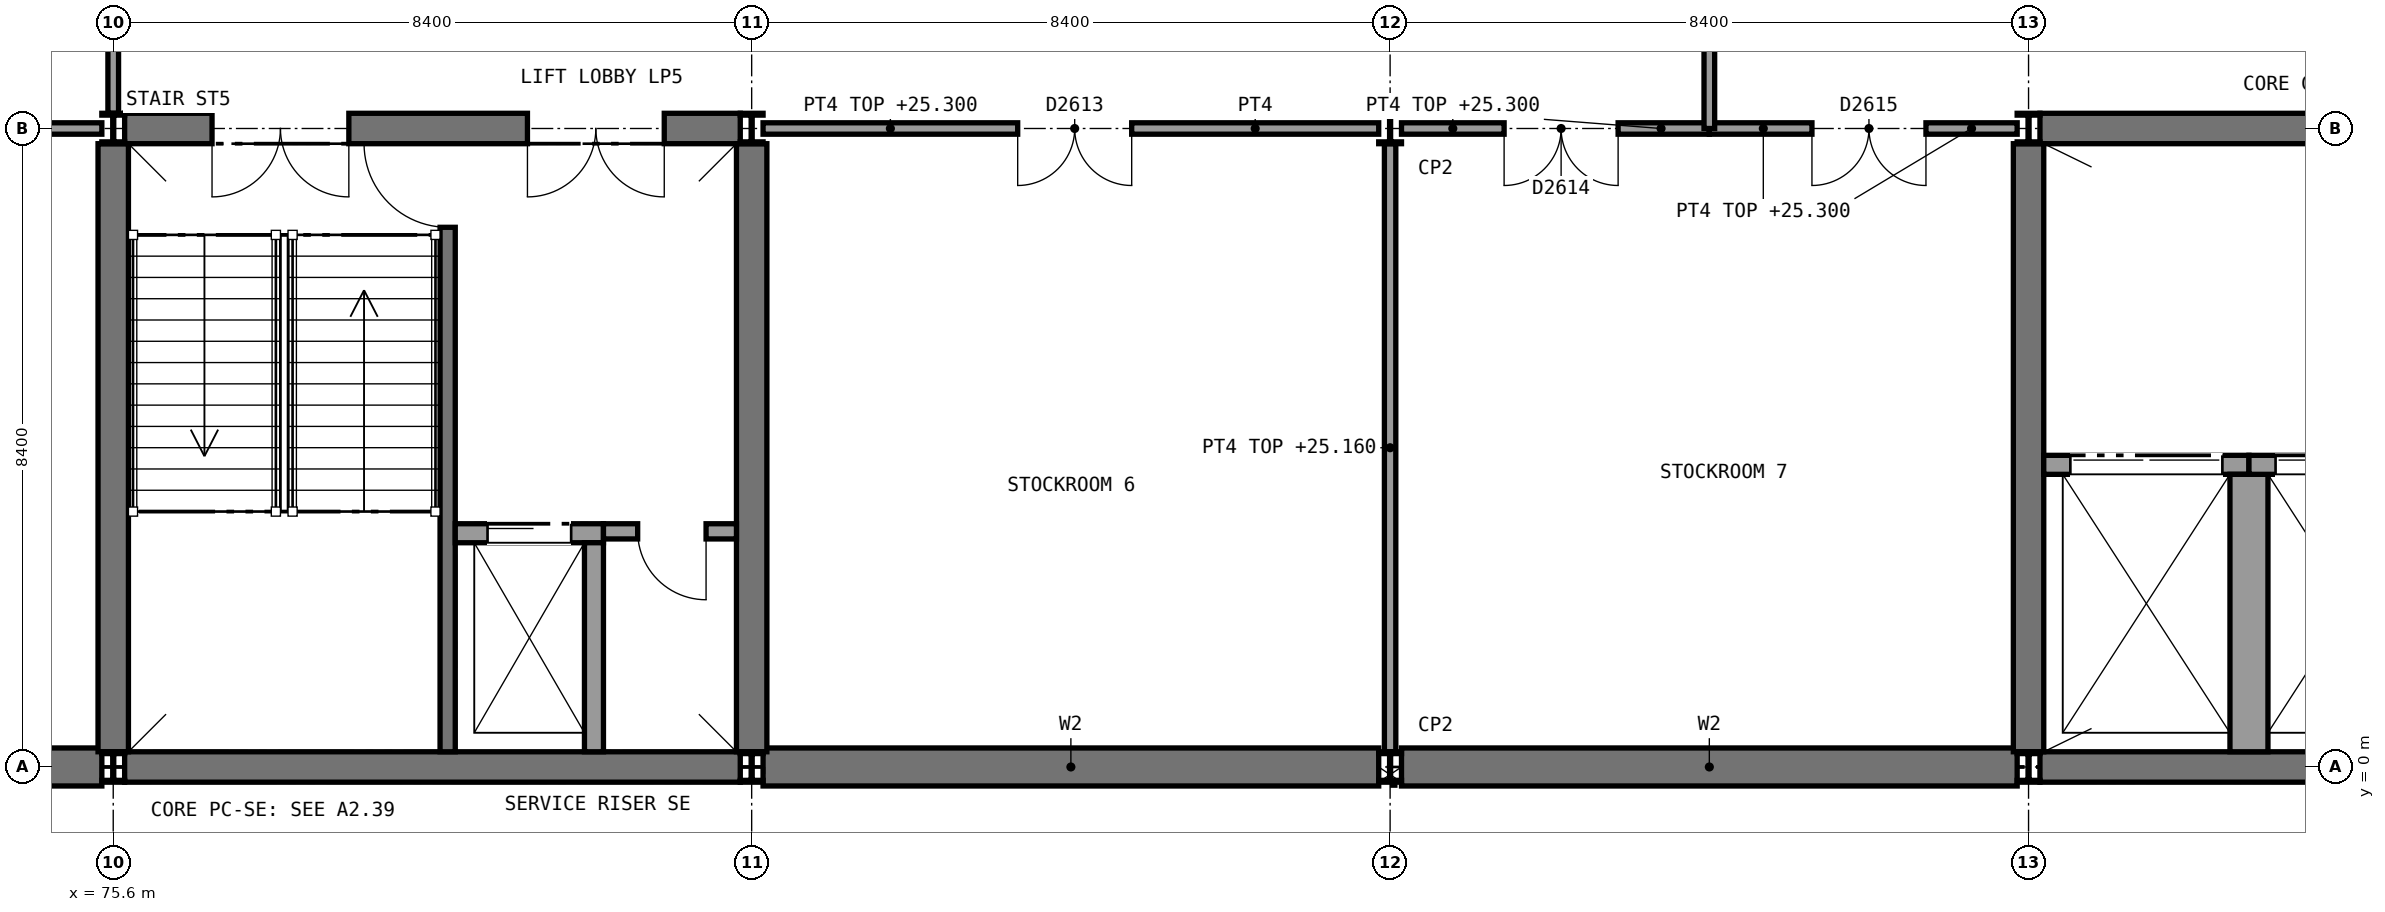
"""IFC4 building model, lengths in metres.
Left out: names, types, materials, properties, quantities, classifications, styles, units other than length and angle.
Written with IfcOpenShell. Run it as: python <this file> out.ifc"""

import sys

from ifc_helpers import new_model, si_unit, direction, frame, frame_2d, origin, origin_2d, place, context, subcontext, project, spatial, rectangle, i_section, extrude, element, fill, save


model = new_model("IFC4")
c1 = context("Model", 3, precision=1e-05, world=origin(), true_north=direction((0.0, 1.0)))
c2 = subcontext(c1, "Body", "Model", "MODEL_VIEW")
j1 = project(units=[si_unit("LENGTHUNIT", "METRE"), si_unit("PLANEANGLEUNIT", "RADIAN")], contexts=[c1])
p1 = place(None, origin())
s1 = spatial("IfcSite", under=j1, at=p1, CompositionType="ELEMENT")
p2 = place(p1, origin())
s2 = spatial("IfcBuilding", under=s1, at=p2, CompositionType="ELEMENT")
p3 = place(p2, frame((0.0, 0.0, 21.0)))
s3 = spatial("IfcBuildingStorey", under=s2, at=p3, CompositionType="ELEMENT", Elevation=21.0)
p4 = place(p3, frame((67.35, 0.0, 0.0), z_axis=(0.0, 0.0, 1.0), x_axis=(1.0, 0.0, 0.0)))
e1 = element("IfcWall", 1, at=p4, inside=s3, PredefinedType="SHEAR", context=c2, shape_type="SweptSolid", body=[
    extrude(rectangle(XDim=8.1, YDim=0.5, at=frame_2d((4.05, 0.0))), origin(), (0.0, 0.0, 1.0), 4.65),
])
p5 = place(p3, frame((84.15, 0.0, 0.0), z_axis=(0.0, 0.0, 1.0), x_axis=(1.0, 0.0, 0.0)))
e2 = element("IfcWall", 2, at=p5, inside=s3, PredefinedType="SHEAR", context=c2, shape_type="SweptSolid", body=[
    extrude(rectangle(XDim=8.1, YDim=0.5, at=frame_2d((4.05, 0.0))), origin(), (0.0, 0.0, 1.0), 4.65),
])
p6 = place(p3, frame((92.55, 0.0, 0.0), z_axis=(0.0, 0.0, 1.0), x_axis=(1.0, 0.0, 0.0)))
e3 = element("IfcWall", 3, at=p6, inside=s3, PredefinedType="SHEAR", context=c2, shape_type="SweptSolid", body=[
    extrude(rectangle(XDim=8.1, YDim=0.5, at=frame_2d((4.05, 0.0))), origin(), (0.0, 0.0, 1.0), 4.65),
])
p7 = place(p3, frame((75.75, 0.0, 0.0), z_axis=(0.0, 0.0, 1.0), x_axis=(1.0, 0.0, 0.0)))
e4 = element("IfcWall", 4, at=p7, inside=s3, PredefinedType="SHEAR", context=c2, shape_type="SweptSolid", body=[
    extrude(rectangle(XDim=8.1, YDim=0.4, at=frame_2d((4.05, 0.0))), origin(), (0.0, 0.0, 1.0), 4.65),
])
p8 = place(p3, frame((75.75, 8.4, 0.0), z_axis=(0.0, 0.0, 1.0), x_axis=(1.0, 0.0, 0.0)))
e5 = element("IfcWall", 5, at=p8, inside=s3, PredefinedType="SHEAR", context=c2, shape_type="SweptSolid", body=[
    extrude(rectangle(XDim=8.1, YDim=0.4, at=frame_2d((4.05, 0.0))), origin(), (0.0, 0.0, 1.0), 4.65),
])
p9 = place(p8, frame((1.15, 0.0, 0.0)))
e6 = element("IfcOpeningElement", 6, at=p9, cuts=e5, PredefinedType="OPENING", context=c2, shape_type="SweptSolid", body=[
    extrude(rectangle(XDim=1.8, YDim=2.1, at=frame_2d((0.9, 1.05))), frame((0.0, 0.21, 0.0), z_axis=(0.0, -1.0, 0.0), x_axis=(1.0, 0.0, 0.0)), (0.0, 0.0, 1.0), 0.42),
])
p10 = place(p8, frame((5.3, 0.0, 0.0)))
e7 = element("IfcOpeningElement", 7, at=p10, cuts=e5, PredefinedType="OPENING", context=c2, shape_type="SweptSolid", body=[
    extrude(rectangle(XDim=1.8, YDim=2.1, at=frame_2d((0.9, 1.05))), frame((0.0, 0.21, 0.0), z_axis=(0.0, -1.0, 0.0), x_axis=(1.0, 0.0, 0.0)), (0.0, 0.0, 1.0), 0.42),
])
for number, where, z_axis, x_axis in (
    (8, (75.6, 0.2, 0.0), (0.0, 0.0, 1.0), (0.0, 1.0, 0.0)),
    (9, (84.0, 0.2, 0.0), (0.0, 0.0, 1.0), (0.0, 1.0, 0.0)),
):
    element("IfcWall", number, at=place(p3, frame(where, z_axis=z_axis, x_axis=x_axis)), inside=s3, PredefinedType="SHEAR", context=c2, shape_type="SweptSolid", body=[
        extrude(rectangle(XDim=8.0, YDim=0.4, at=frame_2d((4.0, 0.0))), origin(), (0.0, 0.0, 1.0), 4.65),
    ])
p11 = place(p3, frame((100.95, 0.0, 0.0), z_axis=(0.0, 0.0, 1.0), x_axis=(1.0, 0.0, 0.0)))
e10 = element("IfcWall", 10, at=p11, inside=s3, PredefinedType="SHEAR", context=c2, shape_type="SweptSolid", body=[
    extrude(rectangle(XDim=16.45, YDim=0.4, at=frame_2d((8.225, 0.0))), origin(), (0.0, 0.0, 1.0), 4.65),
])
p12 = place(p3, frame((100.95, 8.4, 0.0), z_axis=(0.0, 0.0, 1.0), x_axis=(1.0, 0.0, 0.0)))
e11 = element("IfcWall", 11, at=p12, inside=s3, PredefinedType="SHEAR", context=c2, shape_type="SweptSolid", body=[
    extrude(rectangle(XDim=16.45, YDim=0.4, at=frame_2d((8.225, 0.0))), origin(), (0.0, 0.0, 1.0), 4.65),
])
p13 = place(p12, frame((13.55, 0.0, 0.0)))
e12 = element("IfcOpeningElement", 12, at=p13, cuts=e11, PredefinedType="OPENING", context=c2, shape_type="SweptSolid", body=[
    extrude(rectangle(XDim=1.8, YDim=2.1, at=frame_2d((0.9, 1.05))), frame((0.0, 0.21, 0.0), z_axis=(0.0, -1.0, 0.0), x_axis=(1.0, 0.0, 0.0)), (0.0, 0.0, 1.0), 0.42),
])
p14 = place(p12, frame((4.65, 0.0, 0.0)))
e13 = element("IfcOpeningElement", 13, at=p14, cuts=e11, PredefinedType="OPENING", context=c2, shape_type="SweptSolid", body=[
    extrude(rectangle(XDim=2.4, YDim=2.4, at=frame_2d((1.2, 1.2))), frame((0.0, 0.21, 0.0), z_axis=(0.0, -1.0, 0.0), x_axis=(1.0, 0.0, 0.0)), (0.0, 0.0, 1.0), 0.42),
])
p15 = place(p3, frame((100.8, 0.2, 0.0), z_axis=(0.0, 0.0, 1.0), x_axis=(0.0, 1.0, 0.0)))
e14 = element("IfcWall", 14, at=p15, inside=s3, PredefinedType="SHEAR", context=c2, shape_type="SweptSolid", body=[
    extrude(rectangle(XDim=8.0, YDim=0.4, at=frame_2d((4.0, 0.0))), origin(), (0.0, 0.0, 1.0), 4.65),
])
for number, where, z_axis, x_axis in (
    (15, (75.6, 0.0, 0.0), (0.0, 0.0, 1.0), (1.0, 0.0, 0.0)),
    (16, (75.6, 8.4, 0.0), (0.0, 0.0, 1.0), (1.0, 0.0, 0.0)),
    (17, (84.0, 0.0, 0.0), (0.0, 0.0, 1.0), (1.0, 0.0, 0.0)),
    (18, (84.0, 8.4, 0.0), (0.0, 0.0, 1.0), (1.0, 0.0, 0.0)),
    (19, (92.4, 0.0, 0.0), (0.0, 0.0, 1.0), (1.0, 0.0, 0.0)),
    (20, (92.4, 8.4, 0.0), (0.0, 0.0, 1.0), (1.0, 0.0, 0.0)),
    (21, (100.8, 0.0, 0.0), (0.0, 0.0, 1.0), (1.0, 0.0, 0.0)),
    (22, (100.8, 8.4, 0.0), (0.0, 0.0, 1.0), (1.0, 0.0, 0.0)),
):
    element("IfcColumn", number, at=place(p3, frame(where, z_axis=z_axis, x_axis=x_axis)), inside=s3, PredefinedType="COLUMN", context=c2, shape_type="SweptSolid", body=[
        extrude(i_section(OverallWidth=0.3, OverallDepth=0.4, WebThickness=0.013, FlangeThickness=0.024, FilletRadius=0.027, at=origin_2d()), origin(), (0.0, 0.0, 1.0), 4.8),
    ])
p16 = place(p3, frame((67.35, 8.4, 0.0), z_axis=(0.0, 0.0, 1.0), x_axis=(1.0, 0.0, 0.0)))
e23 = element("IfcWall", 23, at=p16, inside=s3, PredefinedType="SOLIDWALL", context=c2, shape_type="SweptSolid", body=[
    extrude(rectangle(XDim=8.1, YDim=0.15, at=frame_2d((4.05, 0.0))), origin(), (0.0, 0.0, 1.0), 4.3),
])
p17 = place(p16, frame((3.35, 0.0, 0.0)))
e24 = element("IfcOpeningElement", 24, at=p17, cuts=e23, PredefinedType="OPENING", context=c2, shape_type="SweptSolid", body=[
    extrude(rectangle(XDim=1.5, YDim=2.1, at=frame_2d((0.75, 1.05))), frame((0.0, 0.085, 0.0), z_axis=(0.0, -1.0, 0.0), x_axis=(1.0, 0.0, 0.0)), (0.0, 0.0, 1.0), 0.17),
])
p18 = place(p3, frame((92.4, 0.2, 0.0), z_axis=(0.0, 0.0, 1.0), x_axis=(0.0, 1.0, 0.0)))
e25 = element("IfcWall", 25, at=p18, inside=s3, PredefinedType="SOLIDWALL", context=c2, shape_type="SweptSolid", body=[
    extrude(rectangle(XDim=8.0, YDim=0.15, at=frame_2d((4.0, 0.0))), origin(), (0.0, 0.0, 1.0), 4.16),
])
p19 = place(p3, frame((84.15, 8.4, 0.0), z_axis=(0.0, 0.0, 1.0), x_axis=(1.0, 0.0, 0.0)))
e26 = element("IfcWall", 26, at=p19, inside=s3, PredefinedType="SOLIDWALL", context=c2, shape_type="SweptSolid", body=[
    extrude(rectangle(XDim=8.1, YDim=0.15, at=frame_2d((4.05, 0.0))), origin(), (0.0, 0.0, 1.0), 4.3),
])
p20 = place(p19, frame((3.35, 0.0, 0.0)))
e27 = element("IfcOpeningElement", 27, at=p20, cuts=e26, PredefinedType="OPENING", context=c2, shape_type="SweptSolid", body=[
    extrude(rectangle(XDim=1.5, YDim=2.1, at=frame_2d((0.75, 1.05))), frame((0.0, 0.085, 0.0), z_axis=(0.0, -1.0, 0.0), x_axis=(1.0, 0.0, 0.0)), (0.0, 0.0, 1.0), 0.17),
])
p21 = place(p3, frame((92.55, 8.4, 0.0), z_axis=(0.0, 0.0, 1.0), x_axis=(1.0, 0.0, 0.0)))
e28 = element("IfcWall", 28, at=p21, inside=s3, PredefinedType="SOLIDWALL", context=c2, shape_type="SweptSolid", body=[
    extrude(rectangle(XDim=4.05, YDim=0.15, at=frame_2d((2.025, 0.0))), origin(), (0.0, 0.0, 1.0), 4.3),
])
p22 = place(p21, frame((1.35, 0.0, 0.0)))
e29 = element("IfcOpeningElement", 29, at=p22, cuts=e28, PredefinedType="OPENING", context=c2, shape_type="SweptSolid", body=[
    extrude(rectangle(XDim=1.5, YDim=2.1, at=frame_2d((0.75, 1.05))), frame((0.0, 0.085, 0.0), z_axis=(0.0, -1.0, 0.0), x_axis=(1.0, 0.0, 0.0)), (0.0, 0.0, 1.0), 0.17),
])
p23 = place(p3, frame((96.6, 8.4, 0.0), z_axis=(0.0, 0.0, 1.0), x_axis=(1.0, 0.0, 0.0)))
e30 = element("IfcWall", 30, at=p23, inside=s3, PredefinedType="SOLIDWALL", context=c2, shape_type="SweptSolid", body=[
    extrude(rectangle(XDim=4.05, YDim=0.15, at=frame_2d((2.025, 0.0))), origin(), (0.0, 0.0, 1.0), 4.3),
])
p24 = place(p23, frame((1.35, 0.0, 0.0)))
e31 = element("IfcOpeningElement", 31, at=p24, cuts=e30, PredefinedType="OPENING", context=c2, shape_type="SweptSolid", body=[
    extrude(rectangle(XDim=1.5, YDim=2.1, at=frame_2d((0.75, 1.05))), frame((0.0, 0.085, 0.0), z_axis=(0.0, -1.0, 0.0), x_axis=(1.0, 0.0, 0.0)), (0.0, 0.0, 1.0), 0.17),
])
p25 = place(p3, frame((75.6, 8.6, 0.0), z_axis=(0.0, 0.0, 1.0), x_axis=(0.0, 1.0, 0.0)))
e32 = element("IfcWall", 32, at=p25, inside=s3, PredefinedType="PARTITIONING", context=c2, shape_type="SweptSolid", body=[
    extrude(rectangle(XDim=3.1, YDim=0.14, at=frame_2d((1.55, 0.0))), origin(), (0.0, 0.0, 1.0), 4.16),
])
p26 = place(p3, frame((96.6, 8.4, 0.0), z_axis=(0.0, 0.0, 1.0), x_axis=(0.0, 1.0, 0.0)))
e33 = element("IfcWall", 33, at=p26, inside=s3, PredefinedType="PARTITIONING", context=c2, shape_type="SweptSolid", body=[
    extrude(rectangle(XDim=7.6, YDim=0.14, at=frame_2d((3.8, 0.0))), origin(), (0.0, 0.0, 1.0), 4.65),
])
p27 = place(p3, frame((80.0, 0.2, 0.0), z_axis=(0.0, 0.0, 1.0), x_axis=(0.0, 1.0, 0.0)))
e34 = element("IfcWall", 34, at=p27, inside=s3, PredefinedType="SHEAR", context=c2, shape_type="SweptSolid", body=[
    extrude(rectangle(XDim=8.0, YDim=0.2, at=frame_2d((4.0, 0.0))), origin(), (0.0, 0.0, 1.0), 4.65),
])
p28 = place(p27, frame((6.9, 0.0, 0.0)))
e35 = element("IfcOpeningElement", 35, at=p28, cuts=e34, PredefinedType="OPENING", context=c2, shape_type="SweptSolid", body=[
    extrude(rectangle(XDim=1.11, YDim=2.1, at=frame_2d((0.555, 1.05))), frame((0.0, 0.11, 0.0), z_axis=(0.0, -1.0, 0.0), x_axis=(1.0, 0.0, 0.0)), (0.0, 0.0, 1.0), 0.22),
])
p29 = place(p3, frame((80.1, 3.075, 0.0), z_axis=(0.0, 0.0, 1.0), x_axis=(1.0, 0.0, 0.0)))
e36 = element("IfcWall", 36, at=p29, inside=s3, PredefinedType="SOLIDWALL", context=c2, shape_type="SweptSolid", body=[
    extrude(rectangle(XDim=1.95, YDim=0.25, at=frame_2d((0.975, 0.0))), origin(), (0.0, 0.0, 1.0), 4.8),
])
p30 = place(p29, frame((0.425, 0.0, 0.0)))
e37 = element("IfcOpeningElement", 37, at=p30, cuts=e36, PredefinedType="OPENING", context=c2, shape_type="SweptSolid", body=[
    extrude(rectangle(XDim=1.1, YDim=2.1, at=frame_2d((0.55, 1.05))), frame((0.0, 0.135, 0.0), z_axis=(0.0, -1.0, 0.0), x_axis=(1.0, 0.0, 0.0)), (0.0, 0.0, 1.0), 0.27),
])
p31 = place(p3, frame((81.925, 0.2, 0.0), z_axis=(0.0, 0.0, 1.0), x_axis=(0.0, 1.0, 0.0)))
e38 = element("IfcWall", 38, at=p31, inside=s3, PredefinedType="SOLIDWALL", context=c2, shape_type="SweptSolid", body=[
    extrude(rectangle(XDim=2.75, YDim=0.25, at=frame_2d((1.375, 0.0))), origin(), (0.0, 0.0, 1.0), 4.8),
])
p32 = place(p3, frame((82.05, 3.1, 0.0), z_axis=(0.0, 0.0, 1.0), x_axis=(1.0, 0.0, 0.0)))
e39 = element("IfcWall", 39, at=p32, inside=s3, PredefinedType="PARTITIONING", context=c2, shape_type="SweptSolid", body=[
    extrude(rectangle(XDim=1.75, YDim=0.2, at=frame_2d((0.875, 0.0))), origin(), (0.0, 0.0, 1.0), 4.65),
])
p33 = place(p32, frame((0.45, 0.0, 0.0)))
e40 = element("IfcOpeningElement", 40, at=p33, cuts=e39, PredefinedType="OPENING", context=c2, shape_type="SweptSolid", body=[
    extrude(rectangle(XDim=0.9, YDim=2.1, at=frame_2d((0.45, 1.05))), frame((0.0, 0.11, 0.0), z_axis=(0.0, -1.0, 0.0), x_axis=(1.0, 0.0, 0.0)), (0.0, 0.0, 1.0), 0.22),
])
p34 = place(p3, frame((101.0, 3.975, 0.0), z_axis=(0.0, 0.0, 1.0), x_axis=(1.0, 0.0, 0.0)))
e41 = element("IfcWall", 41, at=p34, inside=s3, PredefinedType="SOLIDWALL", context=c2, shape_type="SweptSolid", body=[
    extrude(rectangle(XDim=2.7, YDim=0.25, at=frame_2d((1.35, 0.0))), origin(), (0.0, 0.0, 1.0), 4.8),
])
p35 = place(p34, frame((0.35, 0.0, 0.0)))
e42 = element("IfcOpeningElement", 42, at=p35, cuts=e41, PredefinedType="OPENING", context=c2, shape_type="SweptSolid", body=[
    extrude(rectangle(XDim=2.0, YDim=2.2, at=frame_2d((1.0, 1.1))), frame((0.0, 0.135, 0.0), z_axis=(0.0, -1.0, 0.0), x_axis=(1.0, 0.0, 0.0)), (0.0, 0.0, 1.0), 0.27),
])
p36 = place(p3, frame((103.7, 0.2, 0.0), z_axis=(0.0, 0.0, 1.0), x_axis=(0.0, 1.0, 0.0)))
e43 = element("IfcWall", 43, at=p36, inside=s3, PredefinedType="SOLIDWALL", context=c2, shape_type="SweptSolid", body=[
    extrude(rectangle(XDim=3.65, YDim=0.5, at=frame_2d((1.825, 0.0))), origin(), (0.0, 0.0, 1.0), 4.8),
])
p37 = place(p3, frame((103.7, 3.975, 0.0), z_axis=(0.0, 0.0, 1.0), x_axis=(1.0, 0.0, 0.0)))
e44 = element("IfcWall", 44, at=p37, inside=s3, PredefinedType="SOLIDWALL", context=c2, shape_type="SweptSolid", body=[
    extrude(rectangle(XDim=2.7, YDim=0.25, at=frame_2d((1.35, 0.0))), origin(), (0.0, 0.0, 1.0), 4.8),
])
p38 = place(p37, frame((0.35, 0.0, 0.0)))
e45 = element("IfcOpeningElement", 45, at=p38, cuts=e44, PredefinedType="OPENING", context=c2, shape_type="SweptSolid", body=[
    extrude(rectangle(XDim=2.0, YDim=2.2, at=frame_2d((1.0, 1.1))), frame((0.0, 0.135, 0.0), z_axis=(0.0, -1.0, 0.0), x_axis=(1.0, 0.0, 0.0)), (0.0, 0.0, 1.0), 0.27),
])
p39 = place(p20, frame((1.5, 0.0, 0.0), z_axis=(0.0, 0.0, 1.0), x_axis=(-1.0, 0.0, 0.0)))
e46 = element("IfcDoor", 46, at=p39, inside=s3, OperationType="DOUBLE_DOOR_SINGLE_SWING", PredefinedType="DOOR", context=c2, shape_type="SweptSolid", body=[
    extrude(rectangle(XDim=1.5, YDim=2.1, at=frame_2d((0.75, 1.05))), frame((0.0, 0.025, 0.0), z_axis=(0.0, -1.0, 0.0), x_axis=(1.0, 0.0, 0.0)), (0.0, 0.0, 1.0), 0.05),
])
fill(e27, e46)
p40 = place(p22, frame((1.5, 0.0, 0.0), z_axis=(0.0, 0.0, 1.0), x_axis=(-1.0, 0.0, 0.0)))
e47 = element("IfcDoor", 47, at=p40, inside=s3, OperationType="DOUBLE_DOOR_SINGLE_SWING", PredefinedType="DOOR", context=c2, shape_type="SweptSolid", body=[
    extrude(rectangle(XDim=1.5, YDim=2.1, at=frame_2d((0.75, 1.05))), frame((0.0, 0.025, 0.0), z_axis=(0.0, -1.0, 0.0), x_axis=(1.0, 0.0, 0.0)), (0.0, 0.0, 1.0), 0.05),
])
fill(e29, e47)
p41 = place(p24, frame((1.5, 0.0, 0.0), z_axis=(0.0, 0.0, 1.0), x_axis=(-1.0, 0.0, 0.0)))
e48 = element("IfcDoor", 48, at=p41, inside=s3, OperationType="DOUBLE_DOOR_SINGLE_SWING", PredefinedType="DOOR", context=c2, shape_type="SweptSolid", body=[
    extrude(rectangle(XDim=1.5, YDim=2.1, at=frame_2d((0.75, 1.05))), frame((0.0, 0.025, 0.0), z_axis=(0.0, -1.0, 0.0), x_axis=(1.0, 0.0, 0.0)), (0.0, 0.0, 1.0), 0.05),
])
fill(e31, e48)
p42 = place(p28, origin())
e49 = element("IfcDoor", 49, at=p42, inside=s3, OperationType="SINGLE_SWING_RIGHT", PredefinedType="DOOR", context=c2, shape_type="SweptSolid", body=[
    extrude(rectangle(XDim=1.1, YDim=2.1, at=frame_2d((0.55, 1.05))), frame((0.0, 0.025, 0.0), z_axis=(0.0, -1.0, 0.0), x_axis=(1.0, 0.0, 0.0)), (0.0, 0.0, 1.0), 0.05),
])
fill(e35, e49)
p43 = place(p30, origin())
e50 = element("IfcDoor", 50, at=p43, inside=s3, OperationType="SLIDING_TO_LEFT", PredefinedType="DOOR", context=c2, shape_type="SweptSolid", body=[
    extrude(rectangle(XDim=1.1, YDim=2.1, at=frame_2d((0.55, 1.05))), frame((0.0, 0.025, 0.0), z_axis=(0.0, -1.0, 0.0), x_axis=(1.0, 0.0, 0.0)), (0.0, 0.0, 1.0), 0.05),
])
fill(e37, e50)
p44 = place(p33, frame((0.9, 0.0, 0.0), z_axis=(0.0, 0.0, 1.0), x_axis=(-1.0, 0.0, 0.0)))
e51 = element("IfcDoor", 51, at=p44, inside=s3, OperationType="SINGLE_SWING_LEFT", PredefinedType="DOOR", context=c2, shape_type="SweptSolid", body=[
    extrude(rectangle(XDim=0.9, YDim=2.1, at=frame_2d((0.45, 1.05))), frame((0.0, 0.025, 0.0), z_axis=(0.0, -1.0, 0.0), x_axis=(1.0, 0.0, 0.0)), (0.0, 0.0, 1.0), 0.05),
])
fill(e40, e51)
p45 = place(p9, frame((1.8, 0.0, 0.0), z_axis=(0.0, 0.0, 1.0), x_axis=(-1.0, 0.0, 0.0)))
e52 = element("IfcDoor", 52, at=p45, inside=s3, OperationType="DOUBLE_DOOR_SINGLE_SWING", PredefinedType="DOOR", context=c2, shape_type="SweptSolid", body=[
    extrude(rectangle(XDim=1.8, YDim=2.1, at=frame_2d((0.9, 1.05))), frame((0.0, 0.025, 0.0), z_axis=(0.0, -1.0, 0.0), x_axis=(1.0, 0.0, 0.0)), (0.0, 0.0, 1.0), 0.05),
])
fill(e6, e52)
p46 = place(p10, frame((1.8, 0.0, 0.0), z_axis=(0.0, 0.0, 1.0), x_axis=(-1.0, 0.0, 0.0)))
e53 = element("IfcDoor", 53, at=p46, inside=s3, OperationType="DOUBLE_DOOR_SINGLE_SWING", PredefinedType="DOOR", context=c2, shape_type="SweptSolid", body=[
    extrude(rectangle(XDim=1.8, YDim=2.1, at=frame_2d((0.9, 1.05))), frame((0.0, 0.025, 0.0), z_axis=(0.0, -1.0, 0.0), x_axis=(1.0, 0.0, 0.0)), (0.0, 0.0, 1.0), 0.05),
])
fill(e7, e53)
p47 = place(p35, origin())
e54 = element("IfcDoor", 54, at=p47, inside=s3, OperationType="DOUBLE_DOOR_SLIDING", PredefinedType="DOOR", context=c2, shape_type="SweptSolid", body=[
    extrude(rectangle(XDim=2.0, YDim=2.2, at=frame_2d((1.0, 1.1))), frame((0.0, 0.025, 0.0), z_axis=(0.0, -1.0, 0.0), x_axis=(1.0, 0.0, 0.0)), (0.0, 0.0, 1.0), 0.05),
])
fill(e42, e54)
p48 = place(p38, origin())
e55 = element("IfcDoor", 55, at=p48, inside=s3, OperationType="DOUBLE_DOOR_SLIDING", PredefinedType="DOOR", context=c2, shape_type="SweptSolid", body=[
    extrude(rectangle(XDim=2.0, YDim=2.2, at=frame_2d((1.0, 1.1))), frame((0.0, 0.025, 0.0), z_axis=(0.0, -1.0, 0.0), x_axis=(1.0, 0.0, 0.0)), (0.0, 0.0, 1.0), 0.05),
])
fill(e45, e55)
save(model, sys.argv[1])
